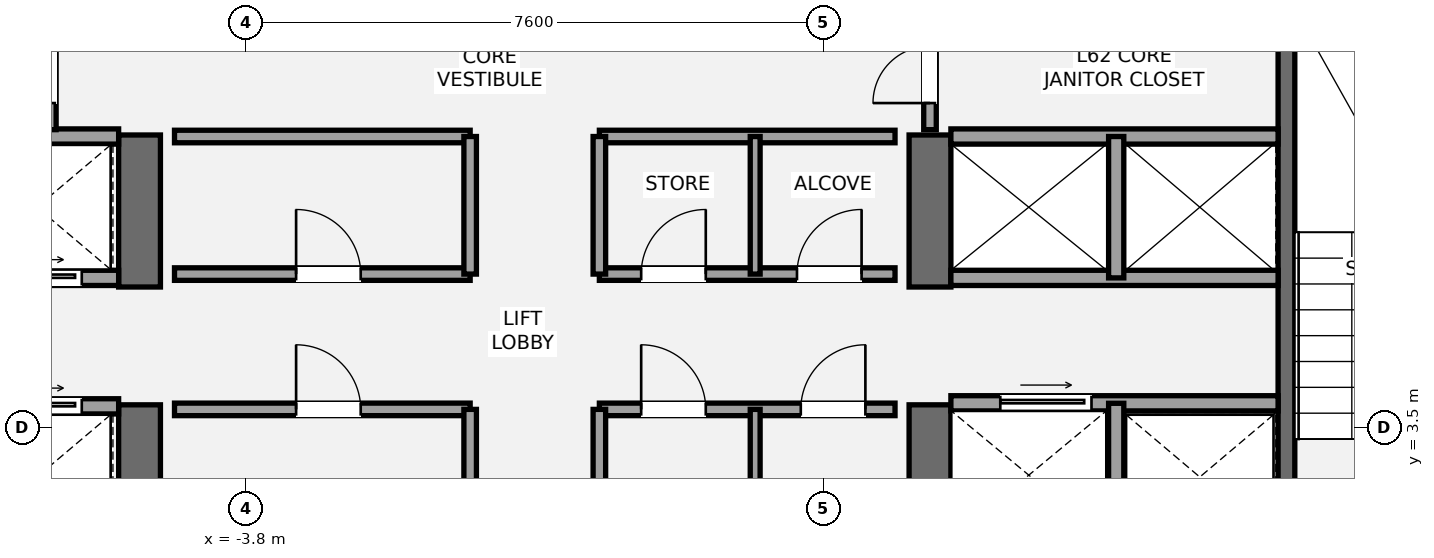
"""IFC4 building model, lengths in metres.
Left out: names, types, materials, properties, quantities, classifications, styles, units other than length and angle.
Written with IfcOpenShell. Run it as: python <this file> out.ifc"""

import sys

from ifc_helpers import new_model, si_unit, direction, frame, frame_2d, origin, place, context, subcontext, project, spatial, rectangle, extrude, element, fill, save


model = new_model("IFC4")
c1 = context("Model", 3, precision=1e-05, world=origin(), true_north=direction((0.0, 1.0)))
c2 = subcontext(c1, "Body", "Model", "MODEL_VIEW")
j1 = project(units=[si_unit("LENGTHUNIT", "METRE"), si_unit("PLANEANGLEUNIT", "RADIAN")], contexts=[c1])
p1 = place(None, origin())
s1 = spatial("IfcSite", under=j1, at=p1, CompositionType="ELEMENT")
p2 = place(p1, origin())
s2 = spatial("IfcBuilding", under=s1, at=p2, CompositionType="ELEMENT")
p3 = place(p2, frame((0.0, 0.0, 222.6)))
s3 = spatial("IfcBuildingStorey", under=s2, at=p3, CompositionType="ELEMENT", Elevation=222.6)
p4 = place(p3, frame((-5.2, 1.3, 0.0), z_axis=(0.0, 0.0, 1.0), x_axis=(0.0, 1.0, 0.0)))
e1 = element("IfcWall", 1, at=p4, inside=s3, PredefinedType="SHEAR", context=c2, shape_type="SweptSolid", body=[
    extrude(rectangle(XDim=2.5, YDim=0.55, at=frame_2d((1.25, 0.0))), origin(), (0.0, 0.0, 1.0), 3.15),
])
p5 = place(p3, frame((-5.2, 5.35, 0.0), z_axis=(0.0, 0.0, 1.0), x_axis=(0.0, 1.0, 0.0)))
e2 = element("IfcWall", 2, at=p5, inside=s3, PredefinedType="SHEAR", context=c2, shape_type="SweptSolid", body=[
    extrude(rectangle(XDim=2.0, YDim=0.55, at=frame_2d((1.0, 0.0))), origin(), (0.0, 0.0, 1.0), 3.15),
])
p6 = place(p3, frame((5.2, 1.3, 0.0), z_axis=(0.0, 0.0, 1.0), x_axis=(0.0, 1.0, 0.0)))
e3 = element("IfcWall", 3, at=p6, inside=s3, PredefinedType="SHEAR", context=c2, shape_type="SweptSolid", body=[
    extrude(rectangle(XDim=2.5, YDim=0.55, at=frame_2d((1.25, 0.0))), origin(), (0.0, 0.0, 1.0), 3.15),
])
p7 = place(p3, frame((5.2, 5.35, 0.0), z_axis=(0.0, 0.0, 1.0), x_axis=(0.0, 1.0, 0.0)))
e4 = element("IfcWall", 4, at=p7, inside=s3, PredefinedType="SHEAR", context=c2, shape_type="SweptSolid", body=[
    extrude(rectangle(XDim=2.0, YDim=0.55, at=frame_2d((1.0, 0.0))), origin(), (0.0, 0.0, 1.0), 3.15),
])
p8 = place(p3, frame((9.89, 1.85, 0.0), z_axis=(0.0, 0.0, 1.0), x_axis=(0.0, 1.0, 0.0)))
e5 = element("IfcWall", 5, at=p8, inside=s3, PredefinedType="SHEAR", context=c2, shape_type="SweptSolid", body=[
    extrude(rectangle(XDim=7.15, YDim=0.22, at=frame_2d((3.575, 0.0))), origin(), (0.0, 0.0, 1.0), 3.15),
])
p9 = place(p3, frame((-9.78, 3.78, 0.0), z_axis=(0.0, 0.0, 1.0), x_axis=(1.0, 0.0, 0.0)))
e6 = element("IfcWall", 6, at=p9, inside=s3, PredefinedType="SOLIDWALL", context=c2, shape_type="SweptSolid", body=[
    extrude(rectangle(XDim=4.305, YDim=0.2, at=frame_2d((2.152, 0.0))), origin(), (0.0, 0.0, 1.0), 2.97),
])
p10 = place(p9, frame((2.72, 0.0, 0.0)))
e7 = element("IfcOpeningElement", 7, at=p10, cuts=e6, PredefinedType="OPENING", context=c2, shape_type="SweptSolid", body=[
    extrude(rectangle(XDim=1.1, YDim=2.2, at=frame_2d((0.55, 1.1))), frame((0.0, 0.11, 0.0), z_axis=(0.0, -1.0, 0.0), x_axis=(1.0, 0.0, 0.0)), (0.0, 0.0, 1.0), 0.22),
])
p11 = place(p3, frame((-9.78, 5.47, 0.0), z_axis=(0.0, 0.0, 1.0), x_axis=(1.0, 0.0, 0.0)))
e8 = element("IfcWall", 8, at=p11, inside=s3, PredefinedType="SOLIDWALL", context=c2, shape_type="SweptSolid", body=[
    extrude(rectangle(XDim=4.305, YDim=0.2, at=frame_2d((2.152, 0.0))), origin(), (0.0, 0.0, 1.0), 2.97),
])
p12 = place(p11, frame((0.55, 0.0, 0.0)))
e9 = element("IfcOpeningElement", 9, at=p12, cuts=e8, PredefinedType="OPENING", context=c2, shape_type="SweptSolid", body=[
    extrude(rectangle(XDim=1.1, YDim=2.2, at=frame_2d((0.55, 1.1))), frame((0.0, 0.11, 0.0), z_axis=(0.0, -1.0, 0.0), x_axis=(1.0, 0.0, 0.0)), (0.0, 0.0, 1.0), 0.22),
])
p13 = place(p11, frame((2.72, 0.0, 0.0)))
e10 = element("IfcOpeningElement", 10, at=p13, cuts=e8, PredefinedType="OPENING", context=c2, shape_type="SweptSolid", body=[
    extrude(rectangle(XDim=1.1, YDim=2.2, at=frame_2d((0.55, 1.1))), frame((0.0, 0.11, 0.0), z_axis=(0.0, -1.0, 0.0), x_axis=(1.0, 0.0, 0.0)), (0.0, 0.0, 1.0), 0.22),
])
p14 = place(p3, frame((-9.78, 7.33, 0.0), z_axis=(0.0, 0.0, 1.0), x_axis=(1.0, 0.0, 0.0)))
e11 = element("IfcWall", 11, at=p14, inside=s3, PredefinedType="SOLIDWALL", context=c2, shape_type="SweptSolid", body=[
    extrude(rectangle(XDim=4.305, YDim=0.2, at=frame_2d((2.152, 0.0))), origin(), (0.0, 0.0, 1.0), 2.97),
])
p15 = place(p3, frame((5.475, 3.82, 0.0), z_axis=(0.0, 0.0, 1.0), x_axis=(1.0, 0.0, 0.0)))
e12 = element("IfcWall", 12, at=p15, inside=s3, PredefinedType="SOLIDWALL", context=c2, shape_type="SweptSolid", body=[
    extrude(rectangle(XDim=4.305, YDim=0.2, at=frame_2d((2.152, 0.0))), origin(), (0.0, 0.0, 1.0), 2.97),
])
p16 = place(p15, frame((0.65, 0.0, 0.0)))
e13 = element("IfcOpeningElement", 13, at=p16, cuts=e12, PredefinedType="OPENING", context=c2, shape_type="SweptSolid", body=[
    extrude(rectangle(XDim=1.2, YDim=2.2, at=frame_2d((0.6, 1.1))), frame((0.0, 0.11, 0.0), z_axis=(0.0, -1.0, 0.0), x_axis=(1.0, 0.0, 0.0)), (0.0, 0.0, 1.0), 0.22),
])
p17 = place(p3, frame((7.65, 1.85, 0.0), z_axis=(0.0, 0.0, 1.0), x_axis=(0.0, 1.0, 0.0)))
e14 = element("IfcWall", 14, at=p17, inside=s3, PredefinedType="SOLIDWALL", context=c2, shape_type="SweptSolid", body=[
    extrude(rectangle(XDim=1.97, YDim=0.2, at=frame_2d((0.985, 0.0))), origin(), (0.0, 0.0, 1.0), 2.97),
])
for number, where, z_axis, x_axis in (
    (15, (5.475, 5.47, 0.0), (0.0, 0.0, 1.0), (1.0, 0.0, 0.0)),
    (16, (5.475, 7.33, 0.0), (0.0, 0.0, 1.0), (1.0, 0.0, 0.0)),
):
    element("IfcWall", number, at=place(p3, frame(where, z_axis=z_axis, x_axis=x_axis)), inside=s3, PredefinedType="SOLIDWALL", context=c2, shape_type="SweptSolid", body=[
        extrude(rectangle(XDim=4.305, YDim=0.2, at=frame_2d((2.152, 0.0))), origin(), (0.0, 0.0, 1.0), 2.97),
    ])
p18 = place(p3, frame((7.65, 5.47, 0.0), z_axis=(0.0, 0.0, 1.0), x_axis=(0.0, 1.0, 0.0)))
e17 = element("IfcWall", 17, at=p18, inside=s3, PredefinedType="SOLIDWALL", context=c2, shape_type="SweptSolid", body=[
    extrude(rectangle(XDim=1.86, YDim=0.2, at=frame_2d((0.93, 0.0))), origin(), (0.0, 0.0, 1.0), 2.97),
])
p19 = place(p3, frame((-4.74, 3.74, 0.0), z_axis=(0.0, 0.0, 1.0), x_axis=(1.0, 0.0, 0.0)))
e18 = element("IfcWall", 18, at=p19, inside=s3, PredefinedType="PARTITIONING", context=c2, shape_type="SweptSolid", body=[
    extrude(rectangle(XDim=3.89, YDim=0.165, at=frame_2d((1.945, 0.0))), origin(), (0.0, 0.0, 1.0), 2.97),
])
p20 = place(p19, frame((1.6, 0.0, 0.0)))
e19 = element("IfcOpeningElement", 19, at=p20, cuts=e18, PredefinedType="OPENING", context=c2, shape_type="SweptSolid", body=[
    extrude(rectangle(XDim=0.85, YDim=2.1, at=frame_2d((0.425, 1.05))), frame((0.0, 0.093, 0.0), z_axis=(0.0, -1.0, 0.0), x_axis=(1.0, 0.0, 0.0)), (0.0, 0.0, 1.0), 0.185),
])
p21 = place(p3, frame((-0.85, 1.92, 0.0), z_axis=(0.0, 0.0, 1.0), x_axis=(0.0, 1.0, 0.0)))
e20 = element("IfcWall", 20, at=p21, inside=s3, PredefinedType="PARTITIONING", context=c2, shape_type="SweptSolid", body=[
    extrude(rectangle(XDim=1.82, YDim=0.165, at=frame_2d((0.91, 0.0))), origin(), (0.0, 0.0, 1.0), 2.97),
])
p22 = place(p3, frame((0.85, 3.74, 0.0), z_axis=(0.0, 0.0, 1.0), x_axis=(1.0, 0.0, 0.0)))
e21 = element("IfcWall", 21, at=p22, inside=s3, PredefinedType="PARTITIONING", context=c2, shape_type="SweptSolid", body=[
    extrude(rectangle(XDim=3.89, YDim=0.165, at=frame_2d((1.945, 0.0))), origin(), (0.0, 0.0, 1.0), 2.97),
])
p23 = place(p22, frame((0.55, 0.0, 0.0)))
e22 = element("IfcOpeningElement", 22, at=p23, cuts=e21, PredefinedType="OPENING", context=c2, shape_type="SweptSolid", body=[
    extrude(rectangle(XDim=0.85, YDim=2.1, at=frame_2d((0.425, 1.05))), frame((0.0, 0.093, 0.0), z_axis=(0.0, -1.0, 0.0), x_axis=(1.0, 0.0, 0.0)), (0.0, 0.0, 1.0), 0.185),
])
p24 = place(p22, frame((2.65, 0.0, 0.0)))
e23 = element("IfcOpeningElement", 23, at=p24, cuts=e21, PredefinedType="OPENING", context=c2, shape_type="SweptSolid", body=[
    extrude(rectangle(XDim=0.85, YDim=2.1, at=frame_2d((0.425, 1.05))), frame((0.0, 0.093, 0.0), z_axis=(0.0, -1.0, 0.0), x_axis=(1.0, 0.0, 0.0)), (0.0, 0.0, 1.0), 0.185),
])
p25 = place(p3, frame((0.85, 1.92, 0.0), z_axis=(0.0, 0.0, 1.0), x_axis=(0.0, 1.0, 0.0)))
e24 = element("IfcWall", 24, at=p25, inside=s3, PredefinedType="PARTITIONING", context=c2, shape_type="SweptSolid", body=[
    extrude(rectangle(XDim=1.82, YDim=0.165, at=frame_2d((0.91, 0.0))), origin(), (0.0, 0.0, 1.0), 2.97),
])
p26 = place(p3, frame((2.9, 1.92, 0.0), z_axis=(0.0, 0.0, 1.0), x_axis=(0.0, 1.0, 0.0)))
e25 = element("IfcWall", 25, at=p26, inside=s3, PredefinedType="PARTITIONING", context=c2, shape_type="SweptSolid", body=[
    extrude(rectangle(XDim=1.82, YDim=0.13, at=frame_2d((0.91, 0.0))), origin(), (0.0, 0.0, 1.0), 2.97),
])
p27 = place(p3, frame((-4.74, 5.52, 0.0), z_axis=(0.0, 0.0, 1.0), x_axis=(1.0, 0.0, 0.0)))
e26 = element("IfcWall", 26, at=p27, inside=s3, PredefinedType="PARTITIONING", context=c2, shape_type="SweptSolid", body=[
    extrude(rectangle(XDim=3.89, YDim=0.165, at=frame_2d((1.945, 0.0))), origin(), (0.0, 0.0, 1.0), 2.97),
])
p28 = place(p27, frame((1.6, 0.0, 0.0)))
e27 = element("IfcOpeningElement", 27, at=p28, cuts=e26, PredefinedType="OPENING", context=c2, shape_type="SweptSolid", body=[
    extrude(rectangle(XDim=0.85, YDim=2.1, at=frame_2d((0.425, 1.05))), frame((0.0, 0.093, 0.0), z_axis=(0.0, -1.0, 0.0), x_axis=(1.0, 0.0, 0.0)), (0.0, 0.0, 1.0), 0.185),
])
p29 = place(p3, frame((-4.74, 7.33, 0.0), z_axis=(0.0, 0.0, 1.0), x_axis=(1.0, 0.0, 0.0)))
e28 = element("IfcWall", 28, at=p29, inside=s3, PredefinedType="PARTITIONING", context=c2, shape_type="SweptSolid", body=[
    extrude(rectangle(XDim=3.89, YDim=0.165, at=frame_2d((1.945, 0.0))), origin(), (0.0, 0.0, 1.0), 2.97),
])
p30 = place(p3, frame((-0.85, 5.52, 0.0), z_axis=(0.0, 0.0, 1.0), x_axis=(0.0, 1.0, 0.0)))
e29 = element("IfcWall", 29, at=p30, inside=s3, PredefinedType="PARTITIONING", context=c2, shape_type="SweptSolid", body=[
    extrude(rectangle(XDim=1.81, YDim=0.165, at=frame_2d((0.905, 0.0))), origin(), (0.0, 0.0, 1.0), 2.97),
])
p31 = place(p3, frame((0.85, 5.52, 0.0), z_axis=(0.0, 0.0, 1.0), x_axis=(1.0, 0.0, 0.0)))
e30 = element("IfcWall", 30, at=p31, inside=s3, PredefinedType="PARTITIONING", context=c2, shape_type="SweptSolid", body=[
    extrude(rectangle(XDim=3.89, YDim=0.165, at=frame_2d((1.945, 0.0))), origin(), (0.0, 0.0, 1.0), 2.97),
])
p32 = place(p31, frame((0.55, 0.0, 0.0)))
e31 = element("IfcOpeningElement", 31, at=p32, cuts=e30, PredefinedType="OPENING", context=c2, shape_type="SweptSolid", body=[
    extrude(rectangle(XDim=0.85, YDim=2.1, at=frame_2d((0.425, 1.05))), frame((0.0, 0.093, 0.0), z_axis=(0.0, -1.0, 0.0), x_axis=(1.0, 0.0, 0.0)), (0.0, 0.0, 1.0), 0.185),
])
p33 = place(p31, frame((2.6, 0.0, 0.0)))
e32 = element("IfcOpeningElement", 32, at=p33, cuts=e30, PredefinedType="OPENING", context=c2, shape_type="SweptSolid", body=[
    extrude(rectangle(XDim=0.85, YDim=2.1, at=frame_2d((0.425, 1.05))), frame((0.0, 0.093, 0.0), z_axis=(0.0, -1.0, 0.0), x_axis=(1.0, 0.0, 0.0)), (0.0, 0.0, 1.0), 0.185),
])
p34 = place(p3, frame((0.85, 7.33, 0.0), z_axis=(0.0, 0.0, 1.0), x_axis=(1.0, 0.0, 0.0)))
e33 = element("IfcWall", 33, at=p34, inside=s3, PredefinedType="PARTITIONING", context=c2, shape_type="SweptSolid", body=[
    extrude(rectangle(XDim=3.89, YDim=0.165, at=frame_2d((1.945, 0.0))), origin(), (0.0, 0.0, 1.0), 2.97),
])
p35 = place(p3, frame((0.85, 5.52, 0.0), z_axis=(0.0, 0.0, 1.0), x_axis=(0.0, 1.0, 0.0)))
e34 = element("IfcWall", 34, at=p35, inside=s3, PredefinedType="PARTITIONING", context=c2, shape_type="SweptSolid", body=[
    extrude(rectangle(XDim=1.81, YDim=0.165, at=frame_2d((0.905, 0.0))), origin(), (0.0, 0.0, 1.0), 2.97),
])
p36 = place(p3, frame((2.9, 5.52, 0.0), z_axis=(0.0, 0.0, 1.0), x_axis=(0.0, 1.0, 0.0)))
e35 = element("IfcWall", 35, at=p36, inside=s3, PredefinedType="PARTITIONING", context=c2, shape_type="SweptSolid", body=[
    extrude(rectangle(XDim=1.81, YDim=0.13, at=frame_2d((0.905, 0.0))), origin(), (0.0, 0.0, 1.0), 2.97),
])
p37 = place(p3, frame((-6.38, 7.42, 0.0), z_axis=(0.0, 0.0, 1.0), x_axis=(0.0, 1.0, 0.0)))
e36 = element("IfcWall", 36, at=p37, inside=s3, PredefinedType="PARTITIONING", context=c2, shape_type="SweptSolid", body=[
    extrude(rectangle(XDim=1.58, YDim=0.165, at=frame_2d((0.79, 0.0))), origin(), (0.0, 0.0, 1.0), 2.97),
])
p38 = place(p37, frame((0.35, 0.0, 0.0)))
e37 = element("IfcOpeningElement", 37, at=p38, cuts=e36, PredefinedType="OPENING", context=c2, shape_type="SweptSolid", body=[
    extrude(rectangle(XDim=0.75, YDim=2.1, at=frame_2d((0.375, 1.05))), frame((0.0, 0.093, 0.0), z_axis=(0.0, -1.0, 0.0), x_axis=(1.0, 0.0, 0.0)), (0.0, 0.0, 1.0), 0.185),
])
p39 = place(p3, frame((5.2, 7.42, 0.0), z_axis=(0.0, 0.0, 1.0), x_axis=(0.0, 1.0, 0.0)))
e38 = element("IfcWall", 38, at=p39, inside=s3, PredefinedType="PARTITIONING", context=c2, shape_type="SweptSolid", body=[
    extrude(rectangle(XDim=1.58, YDim=0.165, at=frame_2d((0.79, 0.0))), origin(), (0.0, 0.0, 1.0), 2.97),
])
p40 = place(p39, frame((0.35, 0.0, 0.0)))
e39 = element("IfcOpeningElement", 39, at=p40, cuts=e38, PredefinedType="OPENING", context=c2, shape_type="SweptSolid", body=[
    extrude(rectangle(XDim=0.75, YDim=2.1, at=frame_2d((0.375, 1.05))), frame((0.0, 0.093, 0.0), z_axis=(0.0, -1.0, 0.0), x_axis=(1.0, 0.0, 0.0)), (0.0, 0.0, 1.0), 0.185),
])
p41 = place(p13, origin())
e40 = element("IfcDoor", 40, at=p41, inside=s3, OperationType="SLIDING_TO_LEFT", PredefinedType="DOOR", context=c2, shape_type="SweptSolid", body=[
    extrude(rectangle(XDim=1.1, YDim=2.2, at=frame_2d((0.55, 1.1))), frame((0.0, 0.025, 0.0), z_axis=(0.0, -1.0, 0.0), x_axis=(1.0, 0.0, 0.0)), (0.0, 0.0, 1.0), 0.05),
])
fill(e10, e40)
p42 = place(p10, origin())
e41 = element("IfcDoor", 41, at=p42, inside=s3, OperationType="SLIDING_TO_LEFT", PredefinedType="DOOR", context=c2, shape_type="SweptSolid", body=[
    extrude(rectangle(XDim=1.1, YDim=2.2, at=frame_2d((0.55, 1.1))), frame((0.0, 0.025, 0.0), z_axis=(0.0, -1.0, 0.0), x_axis=(1.0, 0.0, 0.0)), (0.0, 0.0, 1.0), 0.05),
])
fill(e7, e41)
p43 = place(p16, origin())
e42 = element("IfcDoor", 42, at=p43, inside=s3, OperationType="SLIDING_TO_RIGHT", PredefinedType="DOOR", context=c2, shape_type="SweptSolid", body=[
    extrude(rectangle(XDim=1.2, YDim=2.2, at=frame_2d((0.6, 1.1))), frame((0.0, 0.025, 0.0), z_axis=(0.0, -1.0, 0.0), x_axis=(1.0, 0.0, 0.0)), (0.0, 0.0, 1.0), 0.05),
])
fill(e13, e42)
p44 = place(p20, origin())
e43 = element("IfcDoor", 43, at=p44, inside=s3, OperationType="SINGLE_SWING_LEFT", PredefinedType="DOOR", context=c2, shape_type="SweptSolid", body=[
    extrude(rectangle(XDim=0.85, YDim=2.1, at=frame_2d((0.425, 1.05))), frame((0.0, 0.025, 0.0), z_axis=(0.0, -1.0, 0.0), x_axis=(1.0, 0.0, 0.0)), (0.0, 0.0, 1.0), 0.05),
])
fill(e19, e43)
p45 = place(p23, origin())
e44 = element("IfcDoor", 44, at=p45, inside=s3, OperationType="SINGLE_SWING_LEFT", PredefinedType="DOOR", context=c2, shape_type="SweptSolid", body=[
    extrude(rectangle(XDim=0.85, YDim=2.1, at=frame_2d((0.425, 1.05))), frame((0.0, 0.025, 0.0), z_axis=(0.0, -1.0, 0.0), x_axis=(1.0, 0.0, 0.0)), (0.0, 0.0, 1.0), 0.05),
])
fill(e22, e44)
p46 = place(p24, origin())
e45 = element("IfcDoor", 45, at=p46, inside=s3, OperationType="SINGLE_SWING_RIGHT", PredefinedType="DOOR", context=c2, shape_type="SweptSolid", body=[
    extrude(rectangle(XDim=0.85, YDim=2.1, at=frame_2d((0.425, 1.05))), frame((0.0, 0.025, 0.0), z_axis=(0.0, -1.0, 0.0), x_axis=(1.0, 0.0, 0.0)), (0.0, 0.0, 1.0), 0.05),
])
fill(e23, e45)
p47 = place(p28, origin())
e46 = element("IfcDoor", 46, at=p47, inside=s3, OperationType="SINGLE_SWING_LEFT", PredefinedType="DOOR", context=c2, shape_type="SweptSolid", body=[
    extrude(rectangle(XDim=0.85, YDim=2.1, at=frame_2d((0.425, 1.05))), frame((0.0, 0.025, 0.0), z_axis=(0.0, -1.0, 0.0), x_axis=(1.0, 0.0, 0.0)), (0.0, 0.0, 1.0), 0.05),
])
fill(e27, e46)
p48 = place(p32, origin())
e47 = element("IfcDoor", 47, at=p48, inside=s3, OperationType="SINGLE_SWING_RIGHT", PredefinedType="DOOR", context=c2, shape_type="SweptSolid", body=[
    extrude(rectangle(XDim=0.85, YDim=2.1, at=frame_2d((0.425, 1.05))), frame((0.0, 0.025, 0.0), z_axis=(0.0, -1.0, 0.0), x_axis=(1.0, 0.0, 0.0)), (0.0, 0.0, 1.0), 0.05),
])
fill(e31, e47)
p49 = place(p33, origin())
e48 = element("IfcDoor", 48, at=p49, inside=s3, OperationType="SINGLE_SWING_RIGHT", PredefinedType="DOOR", context=c2, shape_type="SweptSolid", body=[
    extrude(rectangle(XDim=0.85, YDim=2.1, at=frame_2d((0.425, 1.05))), frame((0.0, 0.025, 0.0), z_axis=(0.0, -1.0, 0.0), x_axis=(1.0, 0.0, 0.0)), (0.0, 0.0, 1.0), 0.05),
])
fill(e32, e48)
p50 = place(p40, origin())
e49 = element("IfcDoor", 49, at=p50, inside=s3, OperationType="SINGLE_SWING_LEFT", PredefinedType="DOOR", context=c2, shape_type="SweptSolid", body=[
    extrude(rectangle(XDim=0.75, YDim=2.1, at=frame_2d((0.375, 1.05))), frame((0.0, 0.025, 0.0), z_axis=(0.0, -1.0, 0.0), x_axis=(1.0, 0.0, 0.0)), (0.0, 0.0, 1.0), 0.05),
])
fill(e39, e49)
save(model, sys.argv[1])
